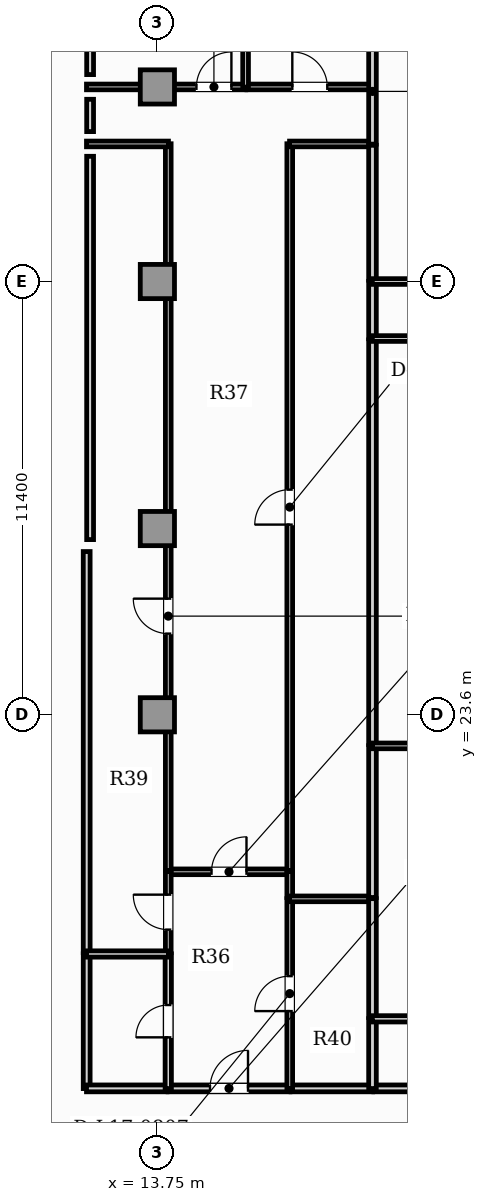
"""IFC4 building model, lengths in metres.
Left out: names, types, materials, properties, quantities, classifications, styles, units other than length and angle.
Written with IfcOpenShell. Run it as: python <this file> out.ifc"""

import sys

from ifc_helpers import new_model, si_unit, direction, frame, frame_2d, origin, origin_2d, place, context, subcontext, project, spatial, rectangle, extrude, element, fill, save


model = new_model("IFC4")
c1 = context("Model", 3, precision=1e-05, world=origin(), true_north=direction((0.0, 1.0)))
c2 = subcontext(c1, "Body", "Model", "MODEL_VIEW")
j1 = project(units=[si_unit("LENGTHUNIT", "METRE"), si_unit("PLANEANGLEUNIT", "RADIAN")], contexts=[c1])
p1 = place(None, origin())
s1 = spatial("IfcSite", under=j1, at=p1, CompositionType="ELEMENT")
p2 = place(p1, origin())
s2 = spatial("IfcBuilding", under=s1, at=p2, CompositionType="ELEMENT")
p3 = place(p2, frame((0.0, 0.0, 72.15)))
s3 = spatial("IfcBuildingStorey", under=s2, at=p3, CompositionType="ELEMENT", Elevation=72.15)
for number, where, z_axis, x_axis in (
    (1, (13.75, 23.6, 0.0), (0.0, 0.0, 1.0), (1.0, 0.0, 0.0)),
    (2, (13.75, 28.5, 0.0), (0.0, 0.0, 1.0), (1.0, 0.0, 0.0)),
    (3, (13.75, 40.12, 0.0), (0.0, 0.0, 1.0), (1.0, 0.0, 0.0)),
    (4, (13.75, 35.0, 0.0), (0.0, 0.0, 1.0), (1.0, 0.0, 0.0)),
):
    element("IfcColumn", number, at=place(p3, frame(where, z_axis=z_axis, x_axis=x_axis)), inside=s3, PredefinedType="COLUMN", context=c2, shape_type="SweptSolid", body=[
        extrude(rectangle(XDim=0.9, YDim=0.9, at=origin_2d()), origin(), (0.0, 0.0, 1.0), 3.85),
    ])
p4 = place(p3, frame((14.031, 13.77, 0.0), z_axis=(0.0, 0.0, 1.0), x_axis=(1.0, 0.0, 0.0)))
e5 = element("IfcWall", 5, at=p4, inside=s3, PredefinedType="PARTITIONING", context=c2, shape_type="SweptSolid", body=[
    extrude(rectangle(XDim=3.206, YDim=0.18, at=frame_2d((1.603, 0.0))), origin(), (0.0, 0.0, 1.0), 3.57),
])
p5 = place(p4, frame((1.103, 0.0, 0.0)))
e6 = element("IfcOpeningElement", 6, at=p5, cuts=e5, PredefinedType="OPENING", context=c2, shape_type="SweptSolid", body=[
    extrude(rectangle(XDim=1.0, YDim=2.15, at=frame_2d((0.5, 1.075))), frame((0.0, 0.1, 0.0), z_axis=(0.0, -1.0, 0.0), x_axis=(1.0, 0.0, 0.0)), (0.0, 0.0, 1.0), 0.2),
])
p6 = place(p3, frame((11.89, 13.765, 0.0), z_axis=(0.0, 0.0, 1.0), x_axis=(0.0, 1.0, 0.0)))
e7 = element("IfcWall", 7, at=p6, inside=s3, PredefinedType="PARTITIONING", context=c2, shape_type="SweptSolid", body=[
    extrude(rectangle(XDim=3.546, YDim=0.18, at=frame_2d((1.773, 0.0))), origin(), (0.0, 0.0, 1.0), 3.57),
])
p7 = place(p3, frame((11.885, 13.77, 0.0), z_axis=(0.0, 0.0, 1.0), x_axis=(1.0, 0.0, 0.0)))
e8 = element("IfcWall", 8, at=p7, inside=s3, PredefinedType="PARTITIONING", context=c2, shape_type="SweptSolid", body=[
    extrude(rectangle(XDim=2.116, YDim=0.18, at=frame_2d((1.058, 0.0))), origin(), (0.0, 0.0, 1.0), 3.57),
])
p8 = place(p3, frame((11.89, 17.341, 0.0), z_axis=(0.0, 0.0, 1.0), x_axis=(0.0, 1.0, 0.0)))
e9 = element("IfcWall", 9, at=p8, inside=s3, PredefinedType="PARTITIONING", context=c2, shape_type="SweptSolid", body=[
    extrude(rectangle(XDim=10.554, YDim=0.18, at=frame_2d((5.277, 0.0))), origin(), (0.0, 0.0, 1.0), 3.57),
])
p9 = place(p3, frame((17.268, 13.77, 0.0), z_axis=(0.0, 0.0, 1.0), x_axis=(1.0, 0.0, 0.0)))
e10 = element("IfcWall", 10, at=p9, inside=s3, PredefinedType="PARTITIONING", context=c2, shape_type="SweptSolid", body=[
    extrude(rectangle(XDim=2.147, YDim=0.18, at=frame_2d((1.074, 0.0))), origin(), (0.0, 0.0, 1.0), 3.57),
])
p10 = place(p3, frame((19.445, 13.77, 0.0), z_axis=(0.0, 0.0, 1.0), x_axis=(1.0, 0.0, 0.0)))
e11 = element("IfcWall", 11, at=p10, inside=s3, PredefinedType="PARTITIONING", context=c2, shape_type="SweptSolid", body=[
    extrude(rectangle(XDim=6.78, YDim=0.18, at=frame_2d((3.39, 0.0))), origin(), (0.0, 0.0, 1.0), 3.57),
])
p11 = place(p3, frame((14.031, 19.469, 0.0), z_axis=(0.0, 0.0, 1.0), x_axis=(1.0, 0.0, 0.0)))
e12 = element("IfcWall", 12, at=p11, inside=s3, PredefinedType="PARTITIONING", context=c2, shape_type="SweptSolid", body=[
    extrude(rectangle(XDim=3.206, YDim=0.15, at=frame_2d((1.603, 0.0))), origin(), (0.0, 0.0, 1.0), 3.57),
])
p12 = place(p11, frame((1.143, 0.0, 0.0)))
e13 = element("IfcOpeningElement", 13, at=p12, cuts=e12, PredefinedType="OPENING", context=c2, shape_type="SweptSolid", body=[
    extrude(rectangle(XDim=0.92, YDim=2.1, at=frame_2d((0.46, 1.05))), frame((0.0, 0.085, 0.0), z_axis=(0.0, -1.0, 0.0), x_axis=(1.0, 0.0, 0.0)), (0.0, 0.0, 1.0), 0.17),
])
p13 = place(p3, frame((14.037, 13.765, 0.0), z_axis=(0.0, 0.0, 1.0), x_axis=(0.0, 1.0, 0.0)))
e14 = element("IfcWall", 14, at=p13, inside=s3, PredefinedType="PLUMBINGWALL", context=c2, shape_type="SweptSolid", body=[
    extrude(rectangle(XDim=3.546, YDim=0.165, at=frame_2d((1.773, 0.0))), origin(), (0.0, 0.0, 1.0), 3.57),
])
p14 = place(p13, frame((1.348, 0.0, 0.0)))
e15 = element("IfcOpeningElement", 15, at=p14, cuts=e14, PredefinedType="OPENING", context=c2, shape_type="SweptSolid", body=[
    extrude(rectangle(XDim=0.85, YDim=2.1, at=frame_2d((0.425, 1.05))), frame((0.0, 0.093, 0.0), z_axis=(0.0, -1.0, 0.0), x_axis=(1.0, 0.0, 0.0)), (0.0, 0.0, 1.0), 0.185),
])
p15 = place(p3, frame((14.037, 17.341, 0.0), z_axis=(0.0, 0.0, 1.0), x_axis=(0.0, 1.0, 0.0)))
e16 = element("IfcWall", 16, at=p15, inside=s3, PredefinedType="PARTITIONING", context=c2, shape_type="SweptSolid", body=[
    extrude(rectangle(XDim=2.132, YDim=0.15, at=frame_2d((1.066, 0.0))), origin(), (0.0, 0.0, 1.0), 3.57),
])
p16 = place(p15, frame((0.606, 0.0, 0.0)))
e17 = element("IfcOpeningElement", 17, at=p16, cuts=e16, PredefinedType="OPENING", context=c2, shape_type="SweptSolid", body=[
    extrude(rectangle(XDim=0.92, YDim=2.1, at=frame_2d((0.46, 1.05))), frame((0.0, 0.085, 0.0), z_axis=(0.0, -1.0, 0.0), x_axis=(1.0, 0.0, 0.0)), (0.0, 0.0, 1.0), 0.17),
])
p17 = place(p3, frame((17.233, 13.765, 0.0), z_axis=(0.0, 0.0, 1.0), x_axis=(0.0, 1.0, 0.0)))
e18 = element("IfcWall", 18, at=p17, inside=s3, PredefinedType="PARTITIONING", context=c2, shape_type="SweptSolid", body=[
    extrude(rectangle(XDim=4.997, YDim=0.15, at=frame_2d((2.499, 0.0))), origin(), (0.0, 0.0, 1.0), 3.57),
])
p18 = place(p17, frame((2.039, 0.0, 0.0)))
e19 = element("IfcOpeningElement", 19, at=p18, cuts=e18, PredefinedType="OPENING", context=c2, shape_type="SweptSolid", body=[
    extrude(rectangle(XDim=0.92, YDim=2.1, at=frame_2d((0.46, 1.05))), frame((0.0, 0.085, 0.0), z_axis=(0.0, -1.0, 0.0), x_axis=(1.0, 0.0, 0.0)), (0.0, 0.0, 1.0), 0.17),
])
p19 = place(p3, frame((17.233, 18.792, 0.0), z_axis=(0.0, 0.0, 1.0), x_axis=(0.0, 1.0, 0.0)))
e20 = element("IfcWall", 20, at=p19, inside=s3, PredefinedType="PARTITIONING", context=c2, shape_type="SweptSolid", body=[
    extrude(rectangle(XDim=0.682, YDim=0.15, at=frame_2d((0.341, 0.0))), origin(), (0.0, 0.0, 1.0), 3.57),
])
p20 = place(p3, frame((14.037, 19.504, 0.0), z_axis=(0.0, 0.0, 1.0), x_axis=(0.0, 1.0, 0.0)))
e21 = element("IfcWall", 21, at=p20, inside=s3, PredefinedType="PARTITIONING", context=c2, shape_type="SweptSolid", body=[
    extrude(rectangle(XDim=19.121, YDim=0.15, at=frame_2d((9.561, 0.0))), origin(), (0.0, 0.0, 1.0), 3.57),
])
p21 = place(p20, frame((6.232, 0.0, 0.0)))
e22 = element("IfcOpeningElement", 22, at=p21, cuts=e21, PredefinedType="OPENING", context=c2, shape_type="SweptSolid", body=[
    extrude(rectangle(XDim=0.92, YDim=2.1, at=frame_2d((0.46, 1.05))), frame((0.0, 0.085, 0.0), z_axis=(0.0, -1.0, 0.0), x_axis=(1.0, 0.0, 0.0)), (0.0, 0.0, 1.0), 0.17),
])
p22 = place(p3, frame((11.885, 38.62, 0.0), z_axis=(0.0, 0.0, 1.0), x_axis=(1.0, 0.0, 0.0)))
e23 = element("IfcWall", 23, at=p22, inside=s3, PredefinedType="PARTITIONING", context=c2, shape_type="SweptSolid", body=[
    extrude(rectangle(XDim=2.156, YDim=0.15, at=frame_2d((1.078, 0.0))), origin(), (0.0, 0.0, 1.0), 3.57),
])
p23 = place(p3, frame((17.233, 19.504, 0.0), z_axis=(0.0, 0.0, 1.0), x_axis=(0.0, 1.0, 0.0)))
e24 = element("IfcWall", 24, at=p23, inside=s3, PredefinedType="PARTITIONING", context=c2, shape_type="SweptSolid", body=[
    extrude(rectangle(XDim=19.121, YDim=0.15, at=frame_2d((9.561, 0.0))), origin(), (0.0, 0.0, 1.0), 3.57),
])
p24 = place(p23, frame((9.101, 0.0, 0.0)))
e25 = element("IfcOpeningElement", 25, at=p24, cuts=e24, PredefinedType="OPENING", context=c2, shape_type="SweptSolid", body=[
    extrude(rectangle(XDim=0.92, YDim=2.1, at=frame_2d((0.46, 1.05))), frame((0.0, 0.085, 0.0), z_axis=(0.0, -1.0, 0.0), x_axis=(1.0, 0.0, 0.0)), (0.0, 0.0, 1.0), 0.17),
])
p25 = place(p3, frame((17.228, 38.62, 0.0), z_axis=(0.0, 0.0, 1.0), x_axis=(1.0, 0.0, 0.0)))
e26 = element("IfcWall", 26, at=p25, inside=s3, PredefinedType="PARTITIONING", context=c2, shape_type="SweptSolid", body=[
    extrude(rectangle(XDim=2.187, YDim=0.15, at=frame_2d((1.094, 0.0))), origin(), (0.0, 0.0, 1.0), 3.57),
])
p26 = place(p3, frame((11.885, 40.12, 0.0), z_axis=(0.0, 0.0, 1.0), x_axis=(1.0, 0.0, 0.0)))
e27 = element("IfcWall", 27, at=p26, inside=s3, PredefinedType="PARTITIONING", context=c2, shape_type="SweptSolid", body=[
    extrude(rectangle(XDim=4.191, YDim=0.15, at=frame_2d((2.096, 0.0))), origin(), (0.0, 0.0, 1.0), 3.57),
])
p27 = place(p26, frame((2.893, 0.0, 0.0)))
e28 = element("IfcOpeningElement", 28, at=p27, cuts=e27, PredefinedType="OPENING", context=c2, shape_type="SweptSolid", body=[
    extrude(rectangle(XDim=0.92, YDim=2.1, at=frame_2d((0.46, 1.05))), frame((0.0, 0.085, 0.0), z_axis=(0.0, -1.0, 0.0), x_axis=(1.0, 0.0, 0.0)), (0.0, 0.0, 1.0), 0.17),
])
p28 = place(p3, frame((16.106, 40.12, 0.0), z_axis=(0.0, 0.0, 1.0), x_axis=(1.0, 0.0, 0.0)))
e29 = element("IfcWall", 29, at=p28, inside=s3, PredefinedType="PARTITIONING", context=c2, shape_type="SweptSolid", body=[
    extrude(rectangle(XDim=3.309, YDim=0.15, at=frame_2d((1.654, 0.0))), origin(), (0.0, 0.0, 1.0), 3.57),
])
p29 = place(p28, frame((1.194, 0.0, 0.0)))
e30 = element("IfcOpeningElement", 30, at=p29, cuts=e29, PredefinedType="OPENING", context=c2, shape_type="SweptSolid", body=[
    extrude(rectangle(XDim=0.92, YDim=2.1, at=frame_2d((0.46, 1.05))), frame((0.0, 0.085, 0.0), z_axis=(0.0, -1.0, 0.0), x_axis=(1.0, 0.0, 0.0)), (0.0, 0.0, 1.0), 0.17),
])
p30 = place(p3, frame((19.41, 38.615, 0.0), z_axis=(0.0, 0.0, 1.0), x_axis=(0.0, 1.0, 0.0)))
e31 = element("IfcWall", 31, at=p30, inside=s3, PredefinedType="PARTITIONING", context=c2, shape_type="SweptSolid", body=[
    extrude(rectangle(XDim=2.775, YDim=0.2, at=frame_2d((1.387, 0.0))), origin(), (0.0, 0.0, 1.0), 3.57),
])
p31 = place(p3, frame((11.885, 17.306, 0.0), z_axis=(0.0, 0.0, 1.0), x_axis=(1.0, 0.0, 0.0)))
e32 = element("IfcWall", 32, at=p31, inside=s3, PredefinedType="PLUMBINGWALL", context=c2, shape_type="SweptSolid", body=[
    extrude(rectangle(XDim=2.156, YDim=0.165, at=frame_2d((1.078, 0.0))), origin(), (0.0, 0.0, 1.0), 3.57),
])
p32 = place(p3, frame((17.228, 18.757, 0.0), z_axis=(0.0, 0.0, 1.0), x_axis=(1.0, 0.0, 0.0)))
e33 = element("IfcWall", 33, at=p32, inside=s3, PredefinedType="PARTITIONING", context=c2, shape_type="SweptSolid", body=[
    extrude(rectangle(XDim=2.187, YDim=0.15, at=frame_2d((1.094, 0.0))), origin(), (0.0, 0.0, 1.0), 3.57),
])
p33 = place(p3, frame((19.41, 13.765, 0.0), z_axis=(0.0, 0.0, 1.0), x_axis=(0.0, 1.0, 0.0)))
e34 = element("IfcWall", 34, at=p33, inside=s3, PredefinedType="PARTITIONING", context=c2, shape_type="SweptSolid", body=[
    extrude(rectangle(XDim=1.84, YDim=0.2, at=frame_2d((0.92, 0.0))), origin(), (0.0, 0.0, 1.0), 3.57),
])
p34 = place(p3, frame((19.41, 15.635, 0.0), z_axis=(0.0, 0.0, 1.0), x_axis=(0.0, 1.0, 0.0)))
e35 = element("IfcWall", 35, at=p34, inside=s3, PredefinedType="PARTITIONING", context=c2, shape_type="SweptSolid", body=[
    extrude(rectangle(XDim=3.127, YDim=0.2, at=frame_2d((1.563, 0.0))), origin(), (0.0, 0.0, 1.0), 3.57),
])
p35 = place(p3, frame((19.41, 33.495, 0.0), z_axis=(0.0, 0.0, 1.0), x_axis=(0.0, 1.0, 0.0)))
e36 = element("IfcWall", 36, at=p35, inside=s3, PredefinedType="PARTITIONING", context=c2, shape_type="SweptSolid", body=[
    extrude(rectangle(XDim=1.51, YDim=0.2, at=frame_2d((0.755, 0.0))), origin(), (0.0, 0.0, 1.0), 3.57),
])
p36 = place(p3, frame((19.41, 18.792, 0.0), z_axis=(0.0, 0.0, 1.0), x_axis=(0.0, 1.0, 0.0)))
e37 = element("IfcWall", 37, at=p36, inside=s3, PredefinedType="PARTITIONING", context=c2, shape_type="SweptSolid", body=[
    extrude(rectangle(XDim=3.995, YDim=0.2, at=frame_2d((1.998, 0.0))), origin(), (0.0, 0.0, 1.0), 3.57),
])
p37 = place(p3, frame((19.41, 22.817, 0.0), z_axis=(0.0, 0.0, 1.0), x_axis=(0.0, 1.0, 0.0)))
e38 = element("IfcWall", 38, at=p37, inside=s3, PredefinedType="PARTITIONING", context=c2, shape_type="SweptSolid", body=[
    extrude(rectangle(XDim=10.648, YDim=0.2, at=frame_2d((5.324, 0.0))), origin(), (0.0, 0.0, 1.0), 3.57),
])
p38 = place(p3, frame((19.41, 35.035, 0.0), z_axis=(0.0, 0.0, 1.0), x_axis=(0.0, 1.0, 0.0)))
e39 = element("IfcWall", 39, at=p38, inside=s3, PredefinedType="PARTITIONING", context=c2, shape_type="SweptSolid", body=[
    extrude(rectangle(XDim=3.55, YDim=0.2, at=frame_2d((1.775, 0.0))), origin(), (0.0, 0.0, 1.0), 3.57),
])
p39 = place(p3, frame((16.071, 40.115, 0.0), z_axis=(0.0, 0.0, 1.0), x_axis=(0.0, 1.0, 0.0)))
e40 = element("IfcWall", 40, at=p39, inside=s3, PredefinedType="PARTITIONING", context=c2, shape_type="SweptSolid", body=[
    extrude(rectangle(XDim=6.075, YDim=0.15, at=frame_2d((3.038, 0.0))), origin(), (0.0, 0.0, 1.0), 3.57),
])
p40 = place(p3, frame((19.405, 33.5, 0.0), z_axis=(0.0, 0.0, 1.0), x_axis=(1.0, 0.0, 0.0)))
e41 = element("IfcWall", 41, at=p40, inside=s3, PredefinedType="PARTITIONING", context=c2, shape_type="SweptSolid", body=[
    extrude(rectangle(XDim=6.86, YDim=0.15, at=frame_2d((3.43, 0.0))), origin(), (0.0, 0.0, 1.0), 3.57),
])
p41 = place(p3, frame((19.405, 35.0, 0.0), z_axis=(0.0, 0.0, 1.0), x_axis=(1.0, 0.0, 0.0)))
e42 = element("IfcWall", 42, at=p41, inside=s3, PredefinedType="PARTITIONING", context=c2, shape_type="SweptSolid", body=[
    extrude(rectangle(XDim=5.522, YDim=0.15, at=frame_2d((2.761, 0.0))), origin(), (0.0, 0.0, 1.0), 2.934),
])
p42 = place(p41, frame((3.129, 0.0, 0.0)))
e43 = element("IfcOpeningElement", 43, at=p42, cuts=e42, PredefinedType="OPENING", context=c2, shape_type="SweptSolid", body=[
    extrude(rectangle(XDim=0.92, YDim=2.1, at=frame_2d((0.46, 1.05))), frame((0.0, 0.085, 0.0), z_axis=(0.0, -1.0, 0.0), x_axis=(1.0, 0.0, 0.0)), (0.0, 0.0, 1.0), 0.17),
])
p43 = place(p3, frame((19.405, 15.6, 0.0), z_axis=(0.0, 0.0, 1.0), x_axis=(1.0, 0.0, 0.0)))
e44 = element("IfcWall", 44, at=p43, inside=s3, PredefinedType="PLUMBINGWALL", context=c2, shape_type="SweptSolid", body=[
    extrude(rectangle(XDim=6.86, YDim=0.165, at=frame_2d((3.43, 0.0))), origin(), (0.0, 0.0, 1.0), 3.57),
])
p44 = place(p3, frame((19.405, 22.782, 0.0), z_axis=(0.0, 0.0, 1.0), x_axis=(1.0, 0.0, 0.0)))
e45 = element("IfcWall", 45, at=p44, inside=s3, PredefinedType="PARTITIONING", context=c2, shape_type="SweptSolid", body=[
    extrude(rectangle(XDim=6.86, YDim=0.15, at=frame_2d((3.43, 0.0))), origin(), (0.0, 0.0, 1.0), 3.57),
])
p45 = place(p3, frame((11.98, 38.945, 0.0), z_axis=(0.0, 0.0, 1.0), x_axis=(0.0, 1.0, 0.0)))
e46 = element("IfcWall", 46, at=p45, inside=s3, PredefinedType="PARTITIONING", context=c2, shape_type="SweptSolid", body=[
    extrude(rectangle(XDim=0.85, YDim=0.18, at=frame_2d((0.425, 0.0))), origin(), (0.0, 0.0, 1.0), 3.57),
])
p46 = place(p3, frame((11.98, 28.21, 0.0), z_axis=(0.0, 0.0, 1.0), x_axis=(0.0, 1.0, 0.0)))
e47 = element("IfcWall", 47, at=p46, inside=s3, PredefinedType="PARTITIONING", context=c2, shape_type="SweptSolid", body=[
    extrude(rectangle(XDim=10.085, YDim=0.18, at=frame_2d((5.042, 0.0))), origin(), (0.0, 0.0, 1.0), 3.57),
])
p47 = place(p3, frame((11.98, 40.445, 0.0), z_axis=(0.0, 0.0, 1.0), x_axis=(0.0, 1.0, 0.0)))
e48 = element("IfcWall", 48, at=p47, inside=s3, PredefinedType="PARTITIONING", context=c2, shape_type="SweptSolid", body=[
    extrude(rectangle(XDim=5.745, YDim=0.18, at=frame_2d((2.873, 0.0))), origin(), (0.0, 0.0, 1.0), 3.57),
])
p48 = place(p5, origin())
e49 = element("IfcDoor", 49, at=p48, inside=s3, OperationType="SINGLE_SWING_RIGHT", PredefinedType="DOOR", context=c2, shape_type="SweptSolid", body=[
    extrude(rectangle(XDim=1.0, YDim=2.15, at=frame_2d((0.5, 1.075))), frame((0.0, 0.025, 0.0), z_axis=(0.0, -1.0, 0.0), x_axis=(1.0, 0.0, 0.0)), (0.0, 0.0, 1.0), 0.05),
])
fill(e6, e49)
p49 = place(p12, origin())
e50 = element("IfcDoor", 50, at=p49, inside=s3, OperationType="SINGLE_SWING_RIGHT", PredefinedType="DOOR", context=c2, shape_type="SweptSolid", body=[
    extrude(rectangle(XDim=0.92, YDim=2.1, at=frame_2d((0.46, 1.05))), frame((0.0, 0.025, 0.0), z_axis=(0.0, -1.0, 0.0), x_axis=(1.0, 0.0, 0.0)), (0.0, 0.0, 1.0), 0.05),
])
fill(e13, e50)
p50 = place(p14, origin())
e51 = element("IfcDoor", 51, at=p50, inside=s3, OperationType="SINGLE_SWING_LEFT", PredefinedType="DOOR", context=c2, shape_type="SweptSolid", body=[
    extrude(rectangle(XDim=0.85, YDim=2.1, at=frame_2d((0.425, 1.05))), frame((0.0, 0.025, 0.0), z_axis=(0.0, -1.0, 0.0), x_axis=(1.0, 0.0, 0.0)), (0.0, 0.0, 1.0), 0.05),
])
fill(e15, e51)
p51 = place(p16, origin())
e52 = element("IfcDoor", 52, at=p51, inside=s3, OperationType="SINGLE_SWING_RIGHT", PredefinedType="DOOR", context=c2, shape_type="SweptSolid", body=[
    extrude(rectangle(XDim=0.92, YDim=2.1, at=frame_2d((0.46, 1.05))), frame((0.0, 0.025, 0.0), z_axis=(0.0, -1.0, 0.0), x_axis=(1.0, 0.0, 0.0)), (0.0, 0.0, 1.0), 0.05),
])
fill(e17, e52)
p52 = place(p18, origin())
e53 = element("IfcDoor", 53, at=p52, inside=s3, OperationType="SINGLE_SWING_LEFT", PredefinedType="DOOR", context=c2, shape_type="SweptSolid", body=[
    extrude(rectangle(XDim=0.92, YDim=2.1, at=frame_2d((0.46, 1.05))), frame((0.0, 0.025, 0.0), z_axis=(0.0, -1.0, 0.0), x_axis=(1.0, 0.0, 0.0)), (0.0, 0.0, 1.0), 0.05),
])
fill(e19, e53)
p53 = place(p21, origin())
e54 = element("IfcDoor", 54, at=p53, inside=s3, OperationType="SINGLE_SWING_RIGHT", PredefinedType="DOOR", context=c2, shape_type="SweptSolid", body=[
    extrude(rectangle(XDim=0.92, YDim=2.1, at=frame_2d((0.46, 1.05))), frame((0.0, 0.025, 0.0), z_axis=(0.0, -1.0, 0.0), x_axis=(1.0, 0.0, 0.0)), (0.0, 0.0, 1.0), 0.05),
])
fill(e22, e54)
p54 = place(p24, origin())
e55 = element("IfcDoor", 55, at=p54, inside=s3, OperationType="SINGLE_SWING_LEFT", PredefinedType="DOOR", context=c2, shape_type="SweptSolid", body=[
    extrude(rectangle(XDim=0.92, YDim=2.1, at=frame_2d((0.46, 1.05))), frame((0.0, 0.025, 0.0), z_axis=(0.0, -1.0, 0.0), x_axis=(1.0, 0.0, 0.0)), (0.0, 0.0, 1.0), 0.05),
])
fill(e25, e55)
p55 = place(p27, origin())
e56 = element("IfcDoor", 56, at=p55, inside=s3, OperationType="SINGLE_SWING_RIGHT", PredefinedType="DOOR", context=c2, shape_type="SweptSolid", body=[
    extrude(rectangle(XDim=0.92, YDim=2.1, at=frame_2d((0.46, 1.05))), frame((0.0, 0.025, 0.0), z_axis=(0.0, -1.0, 0.0), x_axis=(1.0, 0.0, 0.0)), (0.0, 0.0, 1.0), 0.05),
])
fill(e28, e56)
p56 = place(p29, origin())
e57 = element("IfcDoor", 57, at=p56, inside=s3, OperationType="SINGLE_SWING_LEFT", PredefinedType="DOOR", context=c2, shape_type="SweptSolid", body=[
    extrude(rectangle(XDim=0.92, YDim=2.1, at=frame_2d((0.46, 1.05))), frame((0.0, 0.025, 0.0), z_axis=(0.0, -1.0, 0.0), x_axis=(1.0, 0.0, 0.0)), (0.0, 0.0, 1.0), 0.05),
])
fill(e30, e57)
save(model, sys.argv[1])
